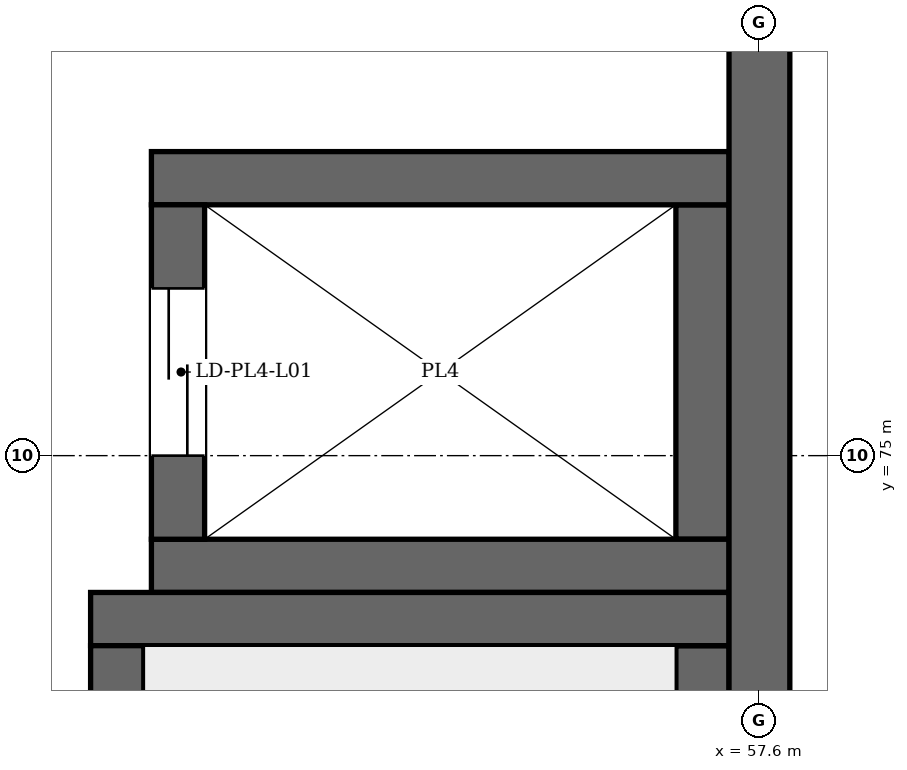
"""IFC4 building model, lengths in metres.
Left out: names, types, materials, properties, quantities, classifications, styles, units other than length and angle.
Written with IfcOpenShell. Run it as: python <this file> out.ifc"""

import sys

from ifc_helpers import new_model, si_unit, direction, frame, frame_2d, origin, place, context, subcontext, project, spatial, rectangle, extrude, element, fill, save


model = new_model("IFC4")
c1 = context("Model", 3, precision=1e-05, world=origin(), true_north=direction((0.0, 1.0)))
c2 = subcontext(c1, "Body", "Model", "MODEL_VIEW")
j1 = project(units=[si_unit("LENGTHUNIT", "METRE"), si_unit("PLANEANGLEUNIT", "RADIAN")], contexts=[c1])
p1 = place(None, origin())
s1 = spatial("IfcSite", under=j1, at=p1, CompositionType="ELEMENT")
p2 = place(p1, origin())
s2 = spatial("IfcBuilding", under=s1, at=p2, CompositionType="ELEMENT")
p3 = place(p2, frame((0.0, 0.0, 6.5)))
s3 = spatial("IfcBuildingStorey", under=s2, at=p3, CompositionType="ELEMENT", Elevation=6.5)
p4 = place(p3, frame((57.6, 46.72, 0.0), z_axis=(0.0, 0.0, 1.0), x_axis=(0.0, 1.0, 0.0)))
e1 = element("IfcWall", 1, at=p4, inside=s3, PredefinedType="SHEAR", context=c2, shape_type="SweptSolid", body=[
    extrude(rectangle(XDim=47.36, YDim=0.4, at=frame_2d((23.68, 0.0))), origin(), (0.0, 0.0, 1.0), 7.7),
])
p5 = place(p3, frame((53.2, 73.925, 0.0), z_axis=(0.0, 0.0, 1.0), x_axis=(1.0, 0.0, 0.0)))
e2 = element("IfcWall", 2, at=p5, inside=s3, PredefinedType="SHEAR", context=c2, shape_type="SweptSolid", body=[
    extrude(rectangle(XDim=4.2, YDim=0.35, at=frame_2d((2.1, 0.0))), origin(), (0.0, 0.0, 1.0), 7.7),
])
for number, where, z_axis, x_axis in (
    (3, (53.375, 67.05, 0.0), (0.0, 0.0, 1.0), (0.0, 1.0, 0.0)),
    (4, (57.225, 67.05, 0.0), (0.0, 0.0, 1.0), (0.0, 1.0, 0.0)),
):
    element("IfcWall", number, at=place(p3, frame(where, z_axis=z_axis, x_axis=x_axis)), inside=s3, PredefinedType="SHEAR", context=c2, shape_type="SweptSolid", body=[
        extrude(rectangle(XDim=6.7, YDim=0.35, at=frame_2d((3.35, 0.0))), origin(), (0.0, 0.0, 1.0), 7.7),
    ])
for number, where, z_axis, x_axis in (
    (5, (53.6, 74.275, 0.0), (0.0, 0.0, 1.0), (1.0, 0.0, 0.0)),
    (6, (53.6, 76.825, 0.0), (0.0, 0.0, 1.0), (1.0, 0.0, 0.0)),
):
    element("IfcWall", number, at=place(p3, frame(where, z_axis=z_axis, x_axis=x_axis)), inside=s3, PredefinedType="SHEAR", context=c2, shape_type="SweptSolid", body=[
        extrude(rectangle(XDim=3.8, YDim=0.35, at=frame_2d((1.9, 0.0))), origin(), (0.0, 0.0, 1.0), 7.7),
    ])
p6 = place(p3, frame((53.775, 74.45, 0.0), z_axis=(0.0, 0.0, 1.0), x_axis=(0.0, 1.0, 0.0)))
e7 = element("IfcWall", 7, at=p6, inside=s3, PredefinedType="SHEAR", context=c2, shape_type="SweptSolid", body=[
    extrude(rectangle(XDim=2.2, YDim=0.35, at=frame_2d((1.1, 0.0))), origin(), (0.0, 0.0, 1.0), 7.7),
])
p7 = place(p6, frame((0.55, 0.0, 0.0)))
e8 = element("IfcOpeningElement", 8, at=p7, cuts=e7, PredefinedType="OPENING", context=c2, shape_type="SweptSolid", body=[
    extrude(rectangle(XDim=1.1, YDim=2.1, at=frame_2d((0.55, 1.05))), frame((0.0, 0.185, 0.0), z_axis=(0.0, -1.0, 0.0), x_axis=(1.0, 0.0, 0.0)), (0.0, 0.0, 1.0), 0.37),
])
p8 = place(p3, frame((57.225, 74.45, 0.0), z_axis=(0.0, 0.0, 1.0), x_axis=(0.0, 1.0, 0.0)))
e9 = element("IfcWall", 9, at=p8, inside=s3, PredefinedType="SHEAR", context=c2, shape_type="SweptSolid", body=[
    extrude(rectangle(XDim=2.2, YDim=0.35, at=frame_2d((1.1, 0.0))), origin(), (0.0, 0.0, 1.0), 7.7),
])
p9 = place(p7, origin())
e10 = element("IfcDoor", 10, at=p9, inside=s3, OperationType="DOUBLE_DOOR_SLIDING", PredefinedType="DOOR", context=c2, shape_type="SweptSolid", body=[
    extrude(rectangle(XDim=1.1, YDim=2.1, at=frame_2d((0.55, 1.05))), frame((0.0, 0.025, 0.0), z_axis=(0.0, -1.0, 0.0), x_axis=(1.0, 0.0, 0.0)), (0.0, 0.0, 1.0), 0.05),
])
fill(e8, e10)
save(model, sys.argv[1])
